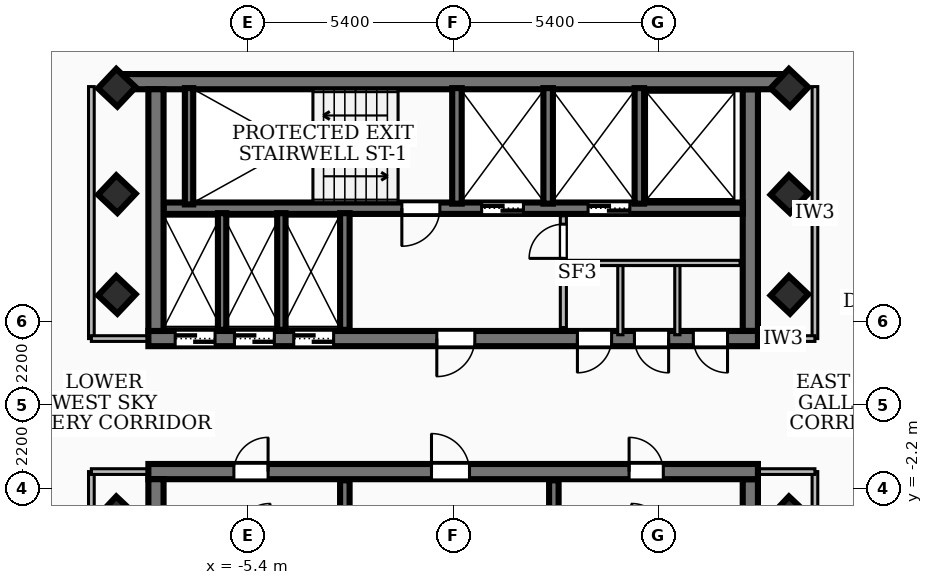
"""IFC4 building model, lengths in metres.
Left out: names, types, materials, properties, quantities, classifications, styles, units other than length and angle.
Written with IfcOpenShell. Run it as: python <this file> out.ifc"""

import sys

from ifc_helpers import new_model, si_unit, direction, frame, frame_2d, origin, origin_2d, place, context, subcontext, project, spatial, rectangle, extrude, element, fill, save


model = new_model("IFC4")
c1 = context("Model", 3, precision=1e-05, world=origin(), true_north=direction((0.0, 1.0)))
c2 = subcontext(c1, "Body", "Model", "MODEL_VIEW")
j1 = project(units=[si_unit("LENGTHUNIT", "METRE"), si_unit("PLANEANGLEUNIT", "RADIAN")], contexts=[c1])
p1 = place(None, origin())
s1 = spatial("IfcSite", under=j1, at=p1, CompositionType="ELEMENT")
p2 = place(p1, origin())
s2 = spatial("IfcBuilding", under=s1, at=p2, CompositionType="ELEMENT")
p3 = place(p2, frame((0.0, 0.0, 244.08)))
s3 = spatial("IfcBuildingStorey", under=s2, at=p3, CompositionType="ELEMENT", Elevation=244.08)
p4 = place(p3, frame((-8.78, 8.51, 0.0), z_axis=(0.0, 0.0, 1.0), x_axis=(1.0, 0.0, 0.0)))
e1 = element("IfcWall", 1, at=p4, inside=s3, PredefinedType="SHEAR", context=c2, shape_type="SweptSolid", body=[
    extrude(rectangle(XDim=17.56, YDim=0.4, at=frame_2d((8.78, 0.0))), origin(), (0.0, 0.0, 1.0), 3.16),
])
p5 = place(p3, frame((8.02, 1.75, 0.0), z_axis=(0.0, 0.0, 1.0), x_axis=(-1.0, 0.0, 0.0)))
e2 = element("IfcWall", 2, at=p5, inside=s3, PredefinedType="SHEAR", context=c2, shape_type="SweptSolid", body=[
    extrude(rectangle(XDim=16.04, YDim=0.4, at=frame_2d((8.02, 0.0))), origin(), (0.0, 0.0, 1.0), 3.16),
])
p6 = place(p5, frame((7.45, 0.0, 0.0)))
e3 = element("IfcOpeningElement", 3, at=p6, cuts=e2, PredefinedType="OPENING", context=c2, shape_type="SweptSolid", body=[
    extrude(rectangle(XDim=1.0, YDim=2.1, at=frame_2d((0.5, 1.05))), frame((0.0, 0.21, 0.0), z_axis=(0.0, -1.0, 0.0), x_axis=(1.0, 0.0, 0.0)), (0.0, 0.0, 1.0), 0.42),
])
p7 = place(p5, frame((14.285, 0.0, 0.0)))
e4 = element("IfcOpeningElement", 4, at=p7, cuts=e2, PredefinedType="OPENING", context=c2, shape_type="SweptSolid", body=[
    extrude(rectangle(XDim=1.05, YDim=2.15, at=frame_2d((0.525, 1.075))), frame((0.0, 0.21, 0.0), z_axis=(0.0, -1.0, 0.0), x_axis=(1.0, 0.0, 0.0)), (0.0, 0.0, 1.0), 0.42),
])
p8 = place(p5, frame((12.725, 0.0, 0.0)))
e5 = element("IfcOpeningElement", 5, at=p8, cuts=e2, PredefinedType="OPENING", context=c2, shape_type="SweptSolid", body=[
    extrude(rectangle(XDim=1.05, YDim=2.15, at=frame_2d((0.525, 1.075))), frame((0.0, 0.21, 0.0), z_axis=(0.0, -1.0, 0.0), x_axis=(1.0, 0.0, 0.0)), (0.0, 0.0, 1.0), 0.42),
])
p9 = place(p5, frame((11.165, 0.0, 0.0)))
e6 = element("IfcOpeningElement", 6, at=p9, cuts=e2, PredefinedType="OPENING", context=c2, shape_type="SweptSolid", body=[
    extrude(rectangle(XDim=1.05, YDim=2.15, at=frame_2d((0.525, 1.075))), frame((0.0, 0.21, 0.0), z_axis=(0.0, -1.0, 0.0), x_axis=(1.0, 0.0, 0.0)), (0.0, 0.0, 1.0), 0.42),
])
p10 = place(p5, frame((3.85, 0.0, 0.0)))
e7 = element("IfcOpeningElement", 7, at=p10, cuts=e2, PredefinedType="OPENING", context=c2, shape_type="SweptSolid", body=[
    extrude(rectangle(XDim=0.9, YDim=2.06, at=frame_2d((0.45, 1.03))), frame((0.0, 0.21, 0.0), z_axis=(0.0, -1.0, 0.0), x_axis=(1.0, 0.0, 0.0)), (0.0, 0.0, 1.0), 0.42),
])
p11 = place(p5, frame((2.35, 0.0, 0.0)))
e8 = element("IfcOpeningElement", 8, at=p11, cuts=e2, PredefinedType="OPENING", context=c2, shape_type="SweptSolid", body=[
    extrude(rectangle(XDim=0.9, YDim=2.06, at=frame_2d((0.45, 1.03))), frame((0.0, 0.21, 0.0), z_axis=(0.0, -1.0, 0.0), x_axis=(1.0, 0.0, 0.0)), (0.0, 0.0, 1.0), 0.42),
])
p12 = place(p5, frame((0.8, 0.0, 0.0)))
e9 = element("IfcOpeningElement", 9, at=p12, cuts=e2, PredefinedType="OPENING", context=c2, shape_type="SweptSolid", body=[
    extrude(rectangle(XDim=0.9, YDim=2.06, at=frame_2d((0.45, 1.03))), frame((0.0, 0.21, 0.0), z_axis=(0.0, -1.0, 0.0), x_axis=(1.0, 0.0, 0.0)), (0.0, 0.0, 1.0), 0.42),
])
for number, where, z_axis, x_axis in (
    (10, (-7.82, 1.95, 0.0), (0.0, 0.0, 1.0), (0.0, 1.0, 0.0)),
    (11, (7.82, 8.31, 0.0), (0.0, 0.0, 1.0), (0.0, -1.0, 0.0)),
):
    element("IfcWall", number, at=place(p3, frame(where, z_axis=z_axis, x_axis=x_axis)), inside=s3, PredefinedType="SHEAR", context=c2, shape_type="SweptSolid", body=[
        extrude(rectangle(XDim=6.36, YDim=0.4, at=frame_2d((3.18, 0.0))), origin(), (0.0, 0.0, 1.0), 3.16),
    ])
p13 = place(p3, frame((7.62, 5.18, 0.0), z_axis=(0.0, 0.0, 1.0), x_axis=(-1.0, 0.0, 0.0)))
e12 = element("IfcWall", 12, at=p13, inside=s3, PredefinedType="SOLIDWALL", context=c2, shape_type="SweptSolid", body=[
    extrude(rectangle(XDim=15.24, YDim=0.3, at=frame_2d((7.62, 0.0))), origin(), (0.0, 0.0, 1.0), 3.16),
])
p14 = place(p13, frame((5.77, 0.0, 0.0)))
e13 = element("IfcOpeningElement", 13, at=p14, cuts=e12, PredefinedType="OPENING", context=c2, shape_type="SweptSolid", body=[
    extrude(rectangle(XDim=1.1, YDim=2.15, at=frame_2d((0.55, 1.075))), frame((0.0, 0.16, 0.0), z_axis=(0.0, -1.0, 0.0), x_axis=(1.0, 0.0, 0.0)), (0.0, 0.0, 1.0), 0.32),
])
p15 = place(p13, frame((2.97, 0.0, 0.0)))
e14 = element("IfcOpeningElement", 14, at=p15, cuts=e12, PredefinedType="OPENING", context=c2, shape_type="SweptSolid", body=[
    extrude(rectangle(XDim=1.1, YDim=2.15, at=frame_2d((0.55, 1.075))), frame((0.0, 0.16, 0.0), z_axis=(0.0, -1.0, 0.0), x_axis=(1.0, 0.0, 0.0)), (0.0, 0.0, 1.0), 0.32),
])
p16 = place(p13, frame((7.97, 0.0, 0.0)))
e15 = element("IfcOpeningElement", 15, at=p16, cuts=e12, PredefinedType="OPENING", context=c2, shape_type="SweptSolid", body=[
    extrude(rectangle(XDim=1.0, YDim=2.1, at=frame_2d((0.5, 1.05))), frame((0.0, 0.16, 0.0), z_axis=(0.0, -1.0, 0.0), x_axis=(1.0, 0.0, 0.0)), (0.0, 0.0, 1.0), 0.32),
])
p17 = place(p3, frame((-8.02, -1.75, 0.0), z_axis=(0.0, 0.0, 1.0), x_axis=(1.0, 0.0, 0.0)))
e16 = element("IfcWall", 16, at=p17, inside=s3, PredefinedType="SHEAR", context=c2, shape_type="SweptSolid", body=[
    extrude(rectangle(XDim=16.04, YDim=0.4, at=frame_2d((8.02, 0.0))), origin(), (0.0, 0.0, 1.0), 3.16),
])
p18 = place(p17, frame((7.45, 0.0, 0.0)))
e17 = element("IfcOpeningElement", 17, at=p18, cuts=e16, PredefinedType="OPENING", context=c2, shape_type="SweptSolid", body=[
    extrude(rectangle(XDim=1.0, YDim=2.1, at=frame_2d((0.5, 1.05))), frame((0.0, 0.21, 0.0), z_axis=(0.0, -1.0, 0.0), x_axis=(1.0, 0.0, 0.0)), (0.0, 0.0, 1.0), 0.42),
])
p19 = place(p17, frame((12.65, 0.0, 0.0)))
e18 = element("IfcOpeningElement", 18, at=p19, cuts=e16, PredefinedType="OPENING", context=c2, shape_type="SweptSolid", body=[
    extrude(rectangle(XDim=0.9, YDim=2.06, at=frame_2d((0.45, 1.03))), frame((0.0, 0.21, 0.0), z_axis=(0.0, -1.0, 0.0), x_axis=(1.0, 0.0, 0.0)), (0.0, 0.0, 1.0), 0.42),
])
p20 = place(p17, frame((2.25, 0.0, 0.0)))
e19 = element("IfcOpeningElement", 19, at=p20, cuts=e16, PredefinedType="OPENING", context=c2, shape_type="SweptSolid", body=[
    extrude(rectangle(XDim=0.9, YDim=2.06, at=frame_2d((0.45, 1.03))), frame((0.0, 0.21, 0.0), z_axis=(0.0, -1.0, 0.0), x_axis=(1.0, 0.0, 0.0)), (0.0, 0.0, 1.0), 0.42),
])
for number, where, z_axis, x_axis in (
    (20, (-7.82, -8.31, 0.0), (0.0, 0.0, 1.0), (0.0, 1.0, 0.0)),
    (21, (7.82, -1.95, 0.0), (0.0, 0.0, 1.0), (0.0, -1.0, 0.0)),
):
    element("IfcWall", number, at=place(p3, frame(where, z_axis=z_axis, x_axis=x_axis)), inside=s3, PredefinedType="SHEAR", context=c2, shape_type="SweptSolid", body=[
        extrude(rectangle(XDim=6.36, YDim=0.4, at=frame_2d((3.18, 0.0))), origin(), (0.0, 0.0, 1.0), 3.16),
    ])
p21 = place(p3, frame((-6.95, 5.28, 0.0), z_axis=(0.0, 0.0, 1.0), x_axis=(0.0, 1.0, 0.0)))
e22 = element("IfcWall", 22, at=p21, inside=s3, PredefinedType="SOLIDWALL", context=c2, shape_type="SweptSolid", body=[
    extrude(rectangle(XDim=3.06, YDim=0.22, at=frame_2d((1.53, 0.0))), origin(), (0.0, 0.0, 1.0), 3.16),
])
for number, where, z_axis, x_axis in (
    (23, (0.1, 5.3, 0.0), (0.0, 0.0, 1.0), (0.0, 1.0, 0.0)),
    (24, (2.5, 5.3, 0.0), (0.0, 0.0, 1.0), (0.0, 1.0, 0.0)),
    (25, (4.9, 5.3, 0.0), (0.0, 0.0, 1.0), (0.0, 1.0, 0.0)),
):
    element("IfcWall", number, at=place(p3, frame(where, z_axis=z_axis, x_axis=x_axis)), inside=s3, PredefinedType="SOLIDWALL", context=c2, shape_type="SweptSolid", body=[
        extrude(rectangle(XDim=3.04, YDim=0.25, at=frame_2d((1.52, 0.0))), origin(), (0.0, 0.0, 1.0), 3.16),
    ])
for number, where, z_axis, x_axis in (
    (26, (-2.85, 1.98, 0.0), (0.0, 0.0, 1.0), (0.0, 1.0, 0.0)),
    (27, (-2.85, -5.05, 0.0), (0.0, 0.0, 1.0), (0.0, 1.0, 0.0)),
    (28, (2.65, -5.05, 0.0), (0.0, 0.0, 1.0), (0.0, 1.0, 0.0)),
):
    element("IfcWall", number, at=place(p3, frame(where, z_axis=z_axis, x_axis=x_axis)), inside=s3, PredefinedType="SOLIDWALL", context=c2, shape_type="SweptSolid", body=[
        extrude(rectangle(XDim=3.07, YDim=0.25, at=frame_2d((1.535, 0.0))), origin(), (0.0, 0.0, 1.0), 3.16),
    ])
for number, where, z_axis, x_axis in (
    (29, (-6.08, 1.98, 0.0), (0.0, 0.0, 1.0), (0.0, 1.0, 0.0)),
    (30, (-4.52, 1.98, 0.0), (0.0, 0.0, 1.0), (0.0, 1.0, 0.0)),
):
    element("IfcWall", number, at=place(p3, frame(where, z_axis=z_axis, x_axis=x_axis)), inside=s3, PredefinedType="SOLIDWALL", context=c2, shape_type="SweptSolid", body=[
        extrude(rectangle(XDim=3.07, YDim=0.22, at=frame_2d((1.535, 0.0))), origin(), (0.0, 0.0, 1.0), 3.16),
    ])
for number, where, z_axis, x_axis in (
    (31, (-8.85, -2.9, 0.0), (0.0, 0.0, 1.0), (0.686, 0.728, 0.0)),
    (32, (-8.85, 2.9, 0.0), (0.0, 0.0, 1.0), (0.686, 0.728, 0.0)),
    (33, (-8.85, 5.55, 0.0), (0.0, 0.0, 1.0), (0.686, 0.728, 0.0)),
    (34, (8.85, -2.9, 0.0), (0.0, 0.0, 1.0), (0.686, 0.728, 0.0)),
    (35, (8.85, 2.9, 0.0), (0.0, 0.0, 1.0), (0.686, 0.728, 0.0)),
    (36, (8.85, 5.55, 0.0), (0.0, 0.0, 1.0), (0.686, 0.728, 0.0)),
    (37, (-8.85, 8.35, 0.0), (0.0, 0.0, 1.0), (0.686, 0.728, 0.0)),
    (38, (8.85, 8.35, 0.0), (0.0, 0.0, 1.0), (0.686, 0.728, 0.0)),
):
    element("IfcColumn", number, at=place(p3, frame(where, z_axis=z_axis, x_axis=x_axis)), inside=s3, PredefinedType="COLUMN", context=c2, shape_type="SweptSolid", body=[
        extrude(rectangle(XDim=0.7, YDim=0.7, at=origin_2d()), origin(), (0.0, 0.0, 1.0), 3.42),
    ])
p22 = place(p3, frame((2.9, 2.04, 0.0), z_axis=(0.0, 0.0, 1.0), x_axis=(0.0, 1.0, 0.0)))
e39 = element("IfcWall", 39, at=p22, inside=s3, PredefinedType="PARTITIONING", context=c2, shape_type="SweptSolid", body=[
    extrude(rectangle(XDim=2.94, YDim=0.16, at=frame_2d((1.47, 0.0))), origin(), (0.0, 0.0, 1.0), 2.39),
])
p23 = place(p22, frame((1.82, 0.0, 0.0)))
e40 = element("IfcOpeningElement", 40, at=p23, cuts=e39, PredefinedType="OPENING", context=c2, shape_type="SweptSolid", body=[
    extrude(rectangle(XDim=0.9, YDim=2.06, at=frame_2d((0.45, 1.03))), frame((0.0, 0.09, 0.0), z_axis=(0.0, -1.0, 0.0), x_axis=(1.0, 0.0, 0.0)), (0.0, 0.0, 1.0), 0.18),
])
p24 = place(p3, frame((2.9, 3.74, 0.0), z_axis=(0.0, 0.0, 1.0), x_axis=(1.0, 0.0, 0.0)))
e41 = element("IfcWall", 41, at=p24, inside=s3, PredefinedType="PARTITIONING", context=c2, shape_type="SweptSolid", body=[
    extrude(rectangle(XDim=4.65, YDim=0.138, at=frame_2d((2.325, 0.0))), origin(), (0.0, 0.0, 1.0), 3.16),
])
for number, where, z_axis, x_axis in (
    (42, (4.4, 1.85, 0.0), (0.0, 0.0, 1.0), (0.0, 1.0, 0.0)),
    (43, (5.9, 1.85, 0.0), (0.0, 0.0, 1.0), (0.0, 1.0, 0.0)),
):
    element("IfcWall", number, at=place(p3, frame(where, z_axis=z_axis, x_axis=x_axis)), inside=s3, PredefinedType="PARTITIONING", context=c2, shape_type="SweptSolid", body=[
        extrude(rectangle(XDim=1.89, YDim=0.138, at=frame_2d((0.945, 0.0))), origin(), (0.0, 0.0, 1.0), 2.39),
    ])
p25 = place(p3, frame((-9.52, 1.75, 0.0), z_axis=(0.0, 0.0, 1.0), x_axis=(0.0, 1.0, 0.0)))
e44 = element("IfcWall", 44, at=p25, inside=s3, PredefinedType="PARTITIONING", context=c2, shape_type="SweptSolid", body=[
    extrude(rectangle(XDim=6.63, YDim=0.15, at=frame_2d((3.315, 0.0))), origin(), (0.0, 0.0, 1.0), 2.53),
])
p26 = place(p3, frame((-7.85, 1.75, 0.0), z_axis=(0.0, 0.0, 1.0), x_axis=(-1.0, 0.0, 0.0)))
e45 = element("IfcWall", 45, at=p26, inside=s3, PredefinedType="PARTITIONING", context=c2, shape_type="SweptSolid", body=[
    extrude(rectangle(XDim=1.67, YDim=0.15, at=frame_2d((0.835, 0.0))), origin(), (0.0, 0.0, 1.0), 2.39),
])
p27 = place(p3, frame((-9.52, -8.38, 0.0), z_axis=(0.0, 0.0, 1.0), x_axis=(0.0, 1.0, 0.0)))
e46 = element("IfcWall", 46, at=p27, inside=s3, PredefinedType="PARTITIONING", context=c2, shape_type="SweptSolid", body=[
    extrude(rectangle(XDim=6.63, YDim=0.15, at=frame_2d((3.315, 0.0))), origin(), (0.0, 0.0, 1.0), 3.16),
])
p28 = place(p3, frame((-7.85, -1.75, 0.0), z_axis=(0.0, 0.0, 1.0), x_axis=(-1.0, 0.0, 0.0)))
e47 = element("IfcWall", 47, at=p28, inside=s3, PredefinedType="PARTITIONING", context=c2, shape_type="SweptSolid", body=[
    extrude(rectangle(XDim=1.67, YDim=0.15, at=frame_2d((0.835, 0.0))), origin(), (0.0, 0.0, 1.0), 2.39),
])
p29 = place(p3, frame((9.52, 1.75, 0.0), z_axis=(0.0, 0.0, 1.0), x_axis=(0.0, 1.0, 0.0)))
e48 = element("IfcWall", 48, at=p29, inside=s3, PredefinedType="PARTITIONING", context=c2, shape_type="SweptSolid", body=[
    extrude(rectangle(XDim=6.63, YDim=0.15, at=frame_2d((3.315, 0.0))), origin(), (0.0, 0.0, 1.0), 3.16),
])
p30 = place(p3, frame((7.85, 1.75, 0.0), z_axis=(0.0, 0.0, 1.0), x_axis=(1.0, 0.0, 0.0)))
e49 = element("IfcWall", 49, at=p30, inside=s3, PredefinedType="PARTITIONING", context=c2, shape_type="SweptSolid", body=[
    extrude(rectangle(XDim=1.67, YDim=0.15, at=frame_2d((0.835, 0.0))), origin(), (0.0, 0.0, 1.0), 2.39),
])
p31 = place(p3, frame((9.52, -8.38, 0.0), z_axis=(0.0, 0.0, 1.0), x_axis=(0.0, 1.0, 0.0)))
e50 = element("IfcWall", 50, at=p31, inside=s3, PredefinedType="PARTITIONING", context=c2, shape_type="SweptSolid", body=[
    extrude(rectangle(XDim=6.63, YDim=0.15, at=frame_2d((3.315, 0.0))), origin(), (0.0, 0.0, 1.0), 2.53),
])
p32 = place(p3, frame((7.85, -1.75, 0.0), z_axis=(0.0, 0.0, 1.0), x_axis=(1.0, 0.0, 0.0)))
e51 = element("IfcWall", 51, at=p32, inside=s3, PredefinedType="PARTITIONING", context=c2, shape_type="SweptSolid", body=[
    extrude(rectangle(XDim=1.67, YDim=0.15, at=frame_2d((0.835, 0.0))), origin(), (0.0, 0.0, 1.0), 2.39),
])
p33 = place(p3, frame((6.75, 16.246, 0.0), z_axis=(0.0, 0.0, 1.0), x_axis=(0.727488049341, -0.686120352464, 0.0)))
e52 = element("IfcWall", 52, at=p33, inside=s3, PredefinedType="PARTITIONING", context=c2, shape_type="SweptSolid", body=[
    extrude(rectangle(XDim=12.47, YDim=0.1, at=frame_2d((6.235, 0.0))), origin(), (0.0, 0.0, 1.0), 2.53),
])
p34 = place(p33, frame((6.155, 0.0, 0.0)))
e53 = element("IfcOpeningElement", 53, at=p34, cuts=e52, PredefinedType="OPENING", context=c2, shape_type="SweptSolid", body=[
    extrude(rectangle(XDim=0.86, YDim=2.04, at=frame_2d((0.43, 1.02))), frame((0.0, 0.06, 0.0), z_axis=(0.0, -1.0, 0.0), x_axis=(1.0, 0.0, 0.0)), (0.0, 0.0, 1.0), 0.12),
])
p35 = place(p33, frame((4.955, 0.0, 0.0)))
e54 = element("IfcOpeningElement", 54, at=p35, cuts=e52, PredefinedType="OPENING", context=c2, shape_type="SweptSolid", body=[
    extrude(rectangle(XDim=0.86, YDim=2.04, at=frame_2d((0.43, 1.02))), frame((0.0, 0.06, 0.0), z_axis=(0.0, -1.0, 0.0), x_axis=(1.0, 0.0, 0.0)), (0.0, 0.0, 1.0), 0.12),
])
p36 = place(p3, frame((-17.271, 2.514, 0.0), z_axis=(0.0, 0.0, 1.0), x_axis=(0.686068145865, 0.727537283739, 0.0)))
e55 = element("IfcWall", 55, at=p36, inside=s3, PredefinedType="PARTITIONING", context=c2, shape_type="SweptSolid", body=[
    extrude(rectangle(XDim=20.04, YDim=0.1, at=frame_2d((10.02, 0.0))), origin(), (0.0, 0.0, 1.0), 2.53),
])
p37 = place(p36, frame((9.76, 0.0, 0.0)))
e56 = element("IfcOpeningElement", 56, at=p37, cuts=e55, PredefinedType="OPENING", context=c2, shape_type="SweptSolid", body=[
    extrude(rectangle(XDim=0.86, YDim=2.04, at=frame_2d((0.43, 1.02))), frame((0.0, 0.06, 0.0), z_axis=(0.0, -1.0, 0.0), x_axis=(1.0, 0.0, 0.0)), (0.0, 0.0, 1.0), 0.12),
])
p38 = place(p36, frame((8.32, 0.0, 0.0)))
e57 = element("IfcOpeningElement", 57, at=p38, cuts=e55, PredefinedType="OPENING", context=c2, shape_type="SweptSolid", body=[
    extrude(rectangle(XDim=0.86, YDim=2.04, at=frame_2d((0.43, 1.02))), frame((0.0, 0.06, 0.0), z_axis=(0.0, -1.0, 0.0), x_axis=(1.0, 0.0, 0.0)), (0.0, 0.0, 1.0), 0.12),
])
p39 = place(p3, frame((17.271, -2.514, 0.0), z_axis=(0.0, 0.0, 1.0), x_axis=(-0.686068145865, -0.727537283739, 0.0)))
e58 = element("IfcWall", 58, at=p39, inside=s3, PredefinedType="PARTITIONING", context=c2, shape_type="SweptSolid", body=[
    extrude(rectangle(XDim=20.04, YDim=0.1, at=frame_2d((10.02, 0.0))), origin(), (0.0, 0.0, 1.0), 2.53),
])
p40 = place(p39, frame((10.86, 0.0, 0.0)))
e59 = element("IfcOpeningElement", 59, at=p40, cuts=e58, PredefinedType="OPENING", context=c2, shape_type="SweptSolid", body=[
    extrude(rectangle(XDim=0.86, YDim=2.04, at=frame_2d((0.43, 1.02))), frame((0.0, 0.06, 0.0), z_axis=(0.0, -1.0, 0.0), x_axis=(1.0, 0.0, 0.0)), (0.0, 0.0, 1.0), 0.12),
])
p41 = place(p39, frame((9.42, 0.0, 0.0)))
e60 = element("IfcOpeningElement", 60, at=p41, cuts=e58, PredefinedType="OPENING", context=c2, shape_type="SweptSolid", body=[
    extrude(rectangle(XDim=0.86, YDim=2.04, at=frame_2d((0.43, 1.02))), frame((0.0, 0.06, 0.0), z_axis=(0.0, -1.0, 0.0), x_axis=(1.0, 0.0, 0.0)), (0.0, 0.0, 1.0), 0.12),
])
p42 = place(p6, origin())
e61 = element("IfcDoor", 61, at=p42, inside=s3, OperationType="SINGLE_SWING_RIGHT", PredefinedType="DOOR", context=c2, shape_type="SweptSolid", body=[
    extrude(rectangle(XDim=1.0, YDim=2.1, at=frame_2d((0.5, 1.05))), frame((0.0, 0.025, 0.0), z_axis=(0.0, -1.0, 0.0), x_axis=(1.0, 0.0, 0.0)), (0.0, 0.0, 1.0), 0.05),
])
fill(e3, e61)
p43 = place(p18, origin())
e62 = element("IfcDoor", 62, at=p43, inside=s3, OperationType="SINGLE_SWING_LEFT", PredefinedType="DOOR", context=c2, shape_type="SweptSolid", body=[
    extrude(rectangle(XDim=1.0, YDim=2.1, at=frame_2d((0.5, 1.05))), frame((0.0, 0.025, 0.0), z_axis=(0.0, -1.0, 0.0), x_axis=(1.0, 0.0, 0.0)), (0.0, 0.0, 1.0), 0.05),
])
fill(e17, e62)
p44 = place(p14, origin())
e63 = element("IfcDoor", 63, at=p44, inside=s3, OperationType="DOUBLE_DOOR_SLIDING", PredefinedType="DOOR", context=c2, shape_type="SweptSolid", body=[
    extrude(rectangle(XDim=1.1, YDim=2.15, at=frame_2d((0.55, 1.075))), frame((0.0, 0.025, 0.0), z_axis=(0.0, -1.0, 0.0), x_axis=(1.0, 0.0, 0.0)), (0.0, 0.0, 1.0), 0.05),
])
fill(e13, e63)
p45 = place(p15, origin())
e64 = element("IfcDoor", 64, at=p45, inside=s3, OperationType="DOUBLE_DOOR_SLIDING", PredefinedType="DOOR", context=c2, shape_type="SweptSolid", body=[
    extrude(rectangle(XDim=1.1, YDim=2.15, at=frame_2d((0.55, 1.075))), frame((0.0, 0.025, 0.0), z_axis=(0.0, -1.0, 0.0), x_axis=(1.0, 0.0, 0.0)), (0.0, 0.0, 1.0), 0.05),
])
fill(e14, e64)
p46 = place(p16, origin())
e65 = element("IfcDoor", 65, at=p46, inside=s3, OperationType="SINGLE_SWING_RIGHT", PredefinedType="DOOR", context=c2, shape_type="SweptSolid", body=[
    extrude(rectangle(XDim=1.0, YDim=2.1, at=frame_2d((0.5, 1.05))), frame((0.0, 0.025, 0.0), z_axis=(0.0, -1.0, 0.0), x_axis=(1.0, 0.0, 0.0)), (0.0, 0.0, 1.0), 0.05),
])
fill(e15, e65)
p47 = place(p7, origin())
e66 = element("IfcDoor", 66, at=p47, inside=s3, OperationType="DOUBLE_DOOR_SLIDING", PredefinedType="DOOR", context=c2, shape_type="SweptSolid", body=[
    extrude(rectangle(XDim=1.05, YDim=2.15, at=frame_2d((0.525, 1.075))), frame((0.0, 0.025, 0.0), z_axis=(0.0, -1.0, 0.0), x_axis=(1.0, 0.0, 0.0)), (0.0, 0.0, 1.0), 0.05),
])
fill(e4, e66)
p48 = place(p8, origin())
e67 = element("IfcDoor", 67, at=p48, inside=s3, OperationType="DOUBLE_DOOR_SLIDING", PredefinedType="DOOR", context=c2, shape_type="SweptSolid", body=[
    extrude(rectangle(XDim=1.05, YDim=2.15, at=frame_2d((0.525, 1.075))), frame((0.0, 0.025, 0.0), z_axis=(0.0, -1.0, 0.0), x_axis=(1.0, 0.0, 0.0)), (0.0, 0.0, 1.0), 0.05),
])
fill(e5, e67)
p49 = place(p9, origin())
e68 = element("IfcDoor", 68, at=p49, inside=s3, OperationType="DOUBLE_DOOR_SLIDING", PredefinedType="DOOR", context=c2, shape_type="SweptSolid", body=[
    extrude(rectangle(XDim=1.05, YDim=2.15, at=frame_2d((0.525, 1.075))), frame((0.0, 0.025, 0.0), z_axis=(0.0, -1.0, 0.0), x_axis=(1.0, 0.0, 0.0)), (0.0, 0.0, 1.0), 0.05),
])
fill(e6, e68)
p50 = place(p19, origin())
e69 = element("IfcDoor", 69, at=p50, inside=s3, OperationType="SINGLE_SWING_LEFT", PredefinedType="DOOR", context=c2, shape_type="SweptSolid", body=[
    extrude(rectangle(XDim=0.9, YDim=2.06, at=frame_2d((0.45, 1.03))), frame((0.0, 0.025, 0.0), z_axis=(0.0, -1.0, 0.0), x_axis=(1.0, 0.0, 0.0)), (0.0, 0.0, 1.0), 0.05),
])
fill(e18, e69)
p51 = place(p20, origin())
e70 = element("IfcDoor", 70, at=p51, inside=s3, OperationType="SINGLE_SWING_RIGHT", PredefinedType="DOOR", context=c2, shape_type="SweptSolid", body=[
    extrude(rectangle(XDim=0.9, YDim=2.06, at=frame_2d((0.45, 1.03))), frame((0.0, 0.025, 0.0), z_axis=(0.0, -1.0, 0.0), x_axis=(1.0, 0.0, 0.0)), (0.0, 0.0, 1.0), 0.05),
])
fill(e19, e70)
p52 = place(p10, origin())
e71 = element("IfcDoor", 71, at=p52, inside=s3, OperationType="SINGLE_SWING_RIGHT", PredefinedType="DOOR", context=c2, shape_type="SweptSolid", body=[
    extrude(rectangle(XDim=0.9, YDim=2.06, at=frame_2d((0.45, 1.03))), frame((0.0, 0.025, 0.0), z_axis=(0.0, -1.0, 0.0), x_axis=(1.0, 0.0, 0.0)), (0.0, 0.0, 1.0), 0.05),
])
fill(e7, e71)
p53 = place(p11, origin())
e72 = element("IfcDoor", 72, at=p53, inside=s3, OperationType="SINGLE_SWING_LEFT", PredefinedType="DOOR", context=c2, shape_type="SweptSolid", body=[
    extrude(rectangle(XDim=0.9, YDim=2.06, at=frame_2d((0.45, 1.03))), frame((0.0, 0.025, 0.0), z_axis=(0.0, -1.0, 0.0), x_axis=(1.0, 0.0, 0.0)), (0.0, 0.0, 1.0), 0.05),
])
fill(e8, e72)
p54 = place(p12, origin())
e73 = element("IfcDoor", 73, at=p54, inside=s3, OperationType="SINGLE_SWING_LEFT", PredefinedType="DOOR", context=c2, shape_type="SweptSolid", body=[
    extrude(rectangle(XDim=0.9, YDim=2.06, at=frame_2d((0.45, 1.03))), frame((0.0, 0.025, 0.0), z_axis=(0.0, -1.0, 0.0), x_axis=(1.0, 0.0, 0.0)), (0.0, 0.0, 1.0), 0.05),
])
fill(e9, e73)
p55 = place(p23, origin())
e74 = element("IfcDoor", 74, at=p55, inside=s3, OperationType="SINGLE_SWING_LEFT", PredefinedType="DOOR", context=c2, shape_type="SweptSolid", body=[
    extrude(rectangle(XDim=0.9, YDim=2.06, at=frame_2d((0.45, 1.03))), frame((0.0, 0.025, 0.0), z_axis=(0.0, -1.0, 0.0), x_axis=(1.0, 0.0, 0.0)), (0.0, 0.0, 1.0), 0.05),
])
fill(e40, e74)
save(model, sys.argv[1])
